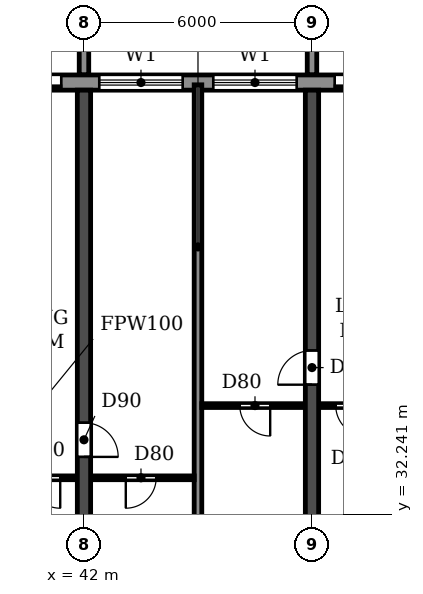
"""IFC4 building model, lengths in metres.
Left out: names, types, materials, properties, quantities, classifications, styles, units other than length and angle.
Written with IfcOpenShell. Run it as: python <this file> out.ifc"""

import sys

from ifc_helpers import new_model, si_unit, direction, frame, frame_2d, origin, place, context, subcontext, project, spatial, polyline, rectangle, outline, extrude, source, transform, mapped, element, fill, save


model = new_model("IFC4")
c1 = context("Model", 3, precision=1e-05, world=origin(), true_north=direction((0.0, 1.0)))
c2 = subcontext(c1, "Body", "Model", "MODEL_VIEW")
j1 = project(units=[si_unit("LENGTHUNIT", "METRE"), si_unit("PLANEANGLEUNIT", "RADIAN")], contexts=[c1])
p1 = place(None, origin())
s1 = spatial("IfcSite", under=j1, at=p1, CompositionType="ELEMENT")
p2 = place(p1, origin())
s2 = spatial("IfcBuilding", under=s1, at=p2, CompositionType="ELEMENT")
p3 = place(p2, frame((0.0, 0.0, 112.5)))
s3 = spatial("IfcBuildingStorey", under=s2, at=p3, CompositionType="ELEMENT", Elevation=112.5)
p4 = place(p3, frame((42.0, 30.525, 0.0), z_axis=(0.0, 0.0, 1.0), x_axis=(0.0, 1.0, 0.0)))
e1 = element("IfcWall", 1, at=p4, inside=s3, PredefinedType="SHEAR", context=c2, shape_type="SweptSolid", body=[
    extrude(rectangle(XDim=12.875, YDim=0.35, at=frame_2d((6.438, 0.0))), origin(), (0.0, 0.0, 1.0), 2.95),
])
p5 = place(p4, frame((3.225, 0.0, 0.0)))
e2 = element("IfcOpeningElement", 2, at=p5, cuts=e1, PredefinedType="OPENING", context=c2, shape_type="SweptSolid", body=[
    extrude(rectangle(XDim=0.9, YDim=2.1, at=frame_2d((0.45, 1.05))), frame((0.0, 0.185, 0.0), z_axis=(0.0, -1.0, 0.0), x_axis=(1.0, 0.0, 0.0)), (0.0, 0.0, 1.0), 0.37),
])
p6 = place(p3, frame((48.0, 30.525, 0.0), z_axis=(0.0, 0.0, 1.0), x_axis=(0.0, 1.0, 0.0)))
e3 = element("IfcWall", 3, at=p6, inside=s3, PredefinedType="SHEAR", context=c2, shape_type="SweptSolid", body=[
    extrude(rectangle(XDim=12.875, YDim=0.35, at=frame_2d((6.438, 0.0))), origin(), (0.0, 0.0, 1.0), 2.95),
])
p7 = place(p6, frame((5.125, 0.0, 0.0)))
e4 = element("IfcOpeningElement", 4, at=p7, cuts=e3, PredefinedType="OPENING", context=c2, shape_type="SweptSolid", body=[
    extrude(rectangle(XDim=0.9, YDim=2.1, at=frame_2d((0.45, 1.05))), frame((0.0, 0.185, 0.0), z_axis=(0.0, -1.0, 0.0), x_axis=(1.0, 0.0, 0.0)), (0.0, 0.0, 1.0), 0.37),
])
p8 = place(p3, frame((85.317, 43.6, 0.0), z_axis=(0.0, 0.0, 1.0), x_axis=(-1.0, 0.0, 0.0)))
e5 = element("IfcWall", 5, at=p8, inside=s3, PredefinedType="STANDARD", context=c2, shape_type="SweptSolid", body=[
    extrude(rectangle(XDim=68.634, YDim=0.4, at=frame_2d((34.317, 0.0))), origin(), (0.0, 0.0, 1.0), 2.95),
])
p9 = place(p8, frame((64.917, 0.0, 0.0)))
e6 = element("IfcOpeningElement", 6, at=p9, cuts=e5, PredefinedType="OPENING", context=c2, shape_type="SweptSolid", body=[
    extrude(rectangle(XDim=1.8, YDim=2.4, at=frame_2d((0.9, 1.2))), frame((0.0, 0.21, 0.0), z_axis=(0.0, -1.0, 0.0), x_axis=(1.0, 0.0, 0.0)), (0.0, 0.0, 1.0), 0.42),
])
p10 = place(p8, frame((61.717, 0.0, 0.9)))
e7 = element("IfcOpeningElement", 7, at=p10, cuts=e5, PredefinedType="OPENING", context=c2, shape_type="SweptSolid", body=[
    extrude(rectangle(XDim=2.2, YDim=1.5, at=frame_2d((1.1, 0.75))), frame((0.0, 0.21, 0.0), z_axis=(0.0, -1.0, 0.0), x_axis=(1.0, 0.0, 0.0)), (0.0, 0.0, 1.0), 0.42),
])
p11 = place(p8, frame((58.717, 0.0, 0.9)))
e8 = element("IfcOpeningElement", 8, at=p11, cuts=e5, PredefinedType="OPENING", context=c2, shape_type="SweptSolid", body=[
    extrude(rectangle(XDim=2.2, YDim=1.5, at=frame_2d((1.1, 0.75))), frame((0.0, 0.21, 0.0), z_axis=(0.0, -1.0, 0.0), x_axis=(1.0, 0.0, 0.0)), (0.0, 0.0, 1.0), 0.42),
])
p12 = place(p8, frame((55.917, 0.0, 0.0)))
e9 = element("IfcOpeningElement", 9, at=p12, cuts=e5, PredefinedType="OPENING", context=c2, shape_type="SweptSolid", body=[
    extrude(rectangle(XDim=1.8, YDim=2.4, at=frame_2d((0.9, 1.2))), frame((0.0, 0.21, 0.0), z_axis=(0.0, -1.0, 0.0), x_axis=(1.0, 0.0, 0.0)), (0.0, 0.0, 1.0), 0.42),
])
p13 = place(p8, frame((52.917, 0.0, 0.0)))
e10 = element("IfcOpeningElement", 10, at=p13, cuts=e5, PredefinedType="OPENING", context=c2, shape_type="SweptSolid", body=[
    extrude(rectangle(XDim=1.8, YDim=2.4, at=frame_2d((0.9, 1.2))), frame((0.0, 0.21, 0.0), z_axis=(0.0, -1.0, 0.0), x_axis=(1.0, 0.0, 0.0)), (0.0, 0.0, 1.0), 0.42),
])
p14 = place(p8, frame((49.717, 0.0, 0.9)))
e11 = element("IfcOpeningElement", 11, at=p14, cuts=e5, PredefinedType="OPENING", context=c2, shape_type="SweptSolid", body=[
    extrude(rectangle(XDim=2.2, YDim=1.5, at=frame_2d((1.1, 0.75))), frame((0.0, 0.21, 0.0), z_axis=(0.0, -1.0, 0.0), x_axis=(1.0, 0.0, 0.0)), (0.0, 0.0, 1.0), 0.42),
])
p15 = place(p8, frame((46.717, 0.0, 0.9)))
e12 = element("IfcOpeningElement", 12, at=p15, cuts=e5, PredefinedType="OPENING", context=c2, shape_type="SweptSolid", body=[
    extrude(rectangle(XDim=2.2, YDim=1.5, at=frame_2d((1.1, 0.75))), frame((0.0, 0.21, 0.0), z_axis=(0.0, -1.0, 0.0), x_axis=(1.0, 0.0, 0.0)), (0.0, 0.0, 1.0), 0.42),
])
p16 = place(p8, frame((43.917, 0.0, 0.0)))
e13 = element("IfcOpeningElement", 13, at=p16, cuts=e5, PredefinedType="OPENING", context=c2, shape_type="SweptSolid", body=[
    extrude(rectangle(XDim=1.8, YDim=2.4, at=frame_2d((0.9, 1.2))), frame((0.0, 0.21, 0.0), z_axis=(0.0, -1.0, 0.0), x_axis=(1.0, 0.0, 0.0)), (0.0, 0.0, 1.0), 0.42),
])
p17 = place(p8, frame((40.717, 0.0, 0.9)))
e14 = element("IfcOpeningElement", 14, at=p17, cuts=e5, PredefinedType="OPENING", context=c2, shape_type="SweptSolid", body=[
    extrude(rectangle(XDim=2.2, YDim=1.5, at=frame_2d((1.1, 0.75))), frame((0.0, 0.21, 0.0), z_axis=(0.0, -1.0, 0.0), x_axis=(1.0, 0.0, 0.0)), (0.0, 0.0, 1.0), 0.42),
])
p18 = place(p8, frame((37.717, 0.0, 0.9)))
e15 = element("IfcOpeningElement", 15, at=p18, cuts=e5, PredefinedType="OPENING", context=c2, shape_type="SweptSolid", body=[
    extrude(rectangle(XDim=2.2, YDim=1.5, at=frame_2d((1.1, 0.75))), frame((0.0, 0.21, 0.0), z_axis=(0.0, -1.0, 0.0), x_axis=(1.0, 0.0, 0.0)), (0.0, 0.0, 1.0), 0.42),
])
p19 = place(p8, frame((34.917, 0.0, 0.0)))
e16 = element("IfcOpeningElement", 16, at=p19, cuts=e5, PredefinedType="OPENING", context=c2, shape_type="SweptSolid", body=[
    extrude(rectangle(XDim=1.8, YDim=2.4, at=frame_2d((0.9, 1.2))), frame((0.0, 0.21, 0.0), z_axis=(0.0, -1.0, 0.0), x_axis=(1.0, 0.0, 0.0)), (0.0, 0.0, 1.0), 0.42),
])
p20 = place(p8, frame((31.717, 0.0, 0.9)))
e17 = element("IfcOpeningElement", 17, at=p20, cuts=e5, PredefinedType="OPENING", context=c2, shape_type="SweptSolid", body=[
    extrude(rectangle(XDim=2.2, YDim=1.5, at=frame_2d((1.1, 0.75))), frame((0.0, 0.21, 0.0), z_axis=(0.0, -1.0, 0.0), x_axis=(1.0, 0.0, 0.0)), (0.0, 0.0, 1.0), 0.42),
])
p21 = place(p8, frame((28.917, 0.0, 0.0)))
e18 = element("IfcOpeningElement", 18, at=p21, cuts=e5, PredefinedType="OPENING", context=c2, shape_type="SweptSolid", body=[
    extrude(rectangle(XDim=1.8, YDim=2.4, at=frame_2d((0.9, 1.2))), frame((0.0, 0.21, 0.0), z_axis=(0.0, -1.0, 0.0), x_axis=(1.0, 0.0, 0.0)), (0.0, 0.0, 1.0), 0.42),
])
p22 = place(p8, frame((25.717, 0.0, 0.9)))
e19 = element("IfcOpeningElement", 19, at=p22, cuts=e5, PredefinedType="OPENING", context=c2, shape_type="SweptSolid", body=[
    extrude(rectangle(XDim=2.2, YDim=1.5, at=frame_2d((1.1, 0.75))), frame((0.0, 0.21, 0.0), z_axis=(0.0, -1.0, 0.0), x_axis=(1.0, 0.0, 0.0)), (0.0, 0.0, 1.0), 0.42),
])
p23 = place(p8, frame((22.717, 0.0, 0.9)))
e20 = element("IfcOpeningElement", 20, at=p23, cuts=e5, PredefinedType="OPENING", context=c2, shape_type="SweptSolid", body=[
    extrude(rectangle(XDim=2.2, YDim=1.5, at=frame_2d((1.1, 0.75))), frame((0.0, 0.21, 0.0), z_axis=(0.0, -1.0, 0.0), x_axis=(1.0, 0.0, 0.0)), (0.0, 0.0, 1.0), 0.42),
])
p24 = place(p8, frame((19.917, 0.0, 0.0)))
e21 = element("IfcOpeningElement", 21, at=p24, cuts=e5, PredefinedType="OPENING", context=c2, shape_type="SweptSolid", body=[
    extrude(rectangle(XDim=1.8, YDim=2.4, at=frame_2d((0.9, 1.2))), frame((0.0, 0.21, 0.0), z_axis=(0.0, -1.0, 0.0), x_axis=(1.0, 0.0, 0.0)), (0.0, 0.0, 1.0), 0.42),
])
p25 = place(p8, frame((16.717, 0.0, 0.9)))
e22 = element("IfcOpeningElement", 22, at=p25, cuts=e5, PredefinedType="OPENING", context=c2, shape_type="SweptSolid", body=[
    extrude(rectangle(XDim=2.2, YDim=1.5, at=frame_2d((1.1, 0.75))), frame((0.0, 0.21, 0.0), z_axis=(0.0, -1.0, 0.0), x_axis=(1.0, 0.0, 0.0)), (0.0, 0.0, 1.0), 0.42),
])
p26 = place(p8, frame((13.917, 0.0, 0.0)))
e23 = element("IfcOpeningElement", 23, at=p26, cuts=e5, PredefinedType="OPENING", context=c2, shape_type="SweptSolid", body=[
    extrude(rectangle(XDim=1.8, YDim=2.4, at=frame_2d((0.9, 1.2))), frame((0.0, 0.21, 0.0), z_axis=(0.0, -1.0, 0.0), x_axis=(1.0, 0.0, 0.0)), (0.0, 0.0, 1.0), 0.42),
])
p27 = place(p8, frame((10.717, 0.0, 0.9)))
e24 = element("IfcOpeningElement", 24, at=p27, cuts=e5, PredefinedType="OPENING", context=c2, shape_type="SweptSolid", body=[
    extrude(rectangle(XDim=2.2, YDim=1.5, at=frame_2d((1.1, 0.75))), frame((0.0, 0.21, 0.0), z_axis=(0.0, -1.0, 0.0), x_axis=(1.0, 0.0, 0.0)), (0.0, 0.0, 1.0), 0.42),
])
p28 = place(p8, frame((7.717, 0.0, 0.9)))
e25 = element("IfcOpeningElement", 25, at=p28, cuts=e5, PredefinedType="OPENING", context=c2, shape_type="SweptSolid", body=[
    extrude(rectangle(XDim=2.2, YDim=1.5, at=frame_2d((1.1, 0.75))), frame((0.0, 0.21, 0.0), z_axis=(0.0, -1.0, 0.0), x_axis=(1.0, 0.0, 0.0)), (0.0, 0.0, 1.0), 0.42),
])
p29 = place(p8, frame((4.917, 0.0, 0.0)))
e26 = element("IfcOpeningElement", 26, at=p29, cuts=e5, PredefinedType="OPENING", context=c2, shape_type="SweptSolid", body=[
    extrude(rectangle(XDim=1.8, YDim=2.4, at=frame_2d((0.9, 1.2))), frame((0.0, 0.21, 0.0), z_axis=(0.0, -1.0, 0.0), x_axis=(1.0, 0.0, 0.0)), (0.0, 0.0, 1.0), 0.42),
])
p30 = place(p8, frame((1.717, 0.0, 0.9)))
e27 = element("IfcOpeningElement", 27, at=p30, cuts=e5, PredefinedType="OPENING", context=c2, shape_type="SweptSolid", body=[
    extrude(rectangle(XDim=2.2, YDim=1.5, at=frame_2d((1.1, 0.75))), frame((0.0, 0.21, 0.0), z_axis=(0.0, -1.0, 0.0), x_axis=(1.0, 0.0, 0.0)), (0.0, 0.0, 1.0), 0.42),
])
m1 = source(origin(), c2, "Body", "SweptSolid", [
    extrude(outline(polyline([(0.0, 0.0), (0.25, 0.0), (0.25, 3.1), (0.0, 3.1), (0.0, 0.0)])), origin(), (0.0, 0.0, 1.0), 3.1),
])
for number, where in (
    (28, (41.875, 43.8, 0.0)),
    (29, (47.875, 43.8, 0.0)),
):
    element("IfcWall", number, at=place(p3, frame(where)), inside=s3, PredefinedType="STANDARD", context=c2, shape_type="MappedRepresentation", body=[
        mapped(m1, transform((0.0, 0.0, 0.0))),
    ])
p31 = place(p3, frame((45.0, 30.535, 0.0), z_axis=(0.0, 0.0, 1.0), x_axis=(0.0, 1.0, 0.0)))
e30 = element("IfcWall", 30, at=p31, inside=s3, PredefinedType="PARTITIONING", context=c2, shape_type="SweptSolid", body=[
    extrude(rectangle(XDim=13.005, YDim=0.2, at=frame_2d((6.502, 0.0))), origin(), (0.0, 0.0, 1.0), 2.95),
])
p32 = place(p3, frame((39.9, 33.2, 0.0), z_axis=(0.0, 0.0, 1.0), x_axis=(1.0, 0.0, 0.0)))
e31 = element("IfcWall", 31, at=p32, inside=s3, PredefinedType="PARTITIONING", context=c2, shape_type="SweptSolid", body=[
    extrude(rectangle(XDim=1.915, YDim=0.1, at=frame_2d((0.958, 0.0))), origin(), (0.0, 0.0, 1.0), 2.95),
])
p33 = place(p32, frame((0.675, 0.0, 0.0)))
e32 = element("IfcOpeningElement", 32, at=p33, cuts=e31, PredefinedType="OPENING", context=c2, shape_type="SweptSolid", body=[
    extrude(rectangle(XDim=0.8, YDim=2.1, at=frame_2d((0.4, 1.05))), frame((0.0, 0.06, 0.0), z_axis=(0.0, -1.0, 0.0), x_axis=(1.0, 0.0, 0.0)), (0.0, 0.0, 1.0), 0.12),
])
p34 = place(p3, frame((42.185, 33.2, 0.0), z_axis=(0.0, 0.0, 1.0), x_axis=(1.0, 0.0, 0.0)))
e33 = element("IfcWall", 33, at=p34, inside=s3, PredefinedType="PARTITIONING", context=c2, shape_type="SweptSolid", body=[
    extrude(rectangle(XDim=2.715, YDim=0.1, at=frame_2d((1.357, 0.0))), origin(), (0.0, 0.0, 1.0), 2.95),
])
p35 = place(p34, frame((0.915, 0.0, 0.0)))
e34 = element("IfcOpeningElement", 34, at=p35, cuts=e33, PredefinedType="OPENING", context=c2, shape_type="SweptSolid", body=[
    extrude(rectangle(XDim=0.8, YDim=2.1, at=frame_2d((0.4, 1.05))), frame((0.0, 0.06, 0.0), z_axis=(0.0, -1.0, 0.0), x_axis=(1.0, 0.0, 0.0)), (0.0, 0.0, 1.0), 0.12),
])
p36 = place(p3, frame((45.1, 35.1, 0.0), z_axis=(0.0, 0.0, 1.0), x_axis=(1.0, 0.0, 0.0)))
e35 = element("IfcWall", 35, at=p36, inside=s3, PredefinedType="PARTITIONING", context=c2, shape_type="SweptSolid", body=[
    extrude(rectangle(XDim=2.715, YDim=0.1, at=frame_2d((1.357, 0.0))), origin(), (0.0, 0.0, 1.0), 2.95),
])
p37 = place(p36, frame((1.0, 0.0, 0.0)))
e36 = element("IfcOpeningElement", 36, at=p37, cuts=e35, PredefinedType="OPENING", context=c2, shape_type="SweptSolid", body=[
    extrude(rectangle(XDim=0.8, YDim=2.1, at=frame_2d((0.4, 1.05))), frame((0.0, 0.06, 0.0), z_axis=(0.0, -1.0, 0.0), x_axis=(1.0, 0.0, 0.0)), (0.0, 0.0, 1.0), 0.12),
])
p38 = place(p3, frame((48.185, 35.1, 0.0), z_axis=(0.0, 0.0, 1.0), x_axis=(1.0, 0.0, 0.0)))
e37 = element("IfcWall", 37, at=p38, inside=s3, PredefinedType="PARTITIONING", context=c2, shape_type="SweptSolid", body=[
    extrude(rectangle(XDim=1.915, YDim=0.1, at=frame_2d((0.958, 0.0))), origin(), (0.0, 0.0, 1.0), 2.95),
])
p39 = place(p38, frame((0.44, 0.0, 0.0)))
e38 = element("IfcOpeningElement", 38, at=p39, cuts=e37, PredefinedType="OPENING", context=c2, shape_type="SweptSolid", body=[
    extrude(rectangle(XDim=0.8, YDim=2.1, at=frame_2d((0.4, 1.05))), frame((0.0, 0.06, 0.0), z_axis=(0.0, -1.0, 0.0), x_axis=(1.0, 0.0, 0.0)), (0.0, 0.0, 1.0), 0.12),
])
p40 = place(p16, origin())
e39 = element("IfcDoor", 39, at=p40, inside=s3, OperationType="DOUBLE_DOOR_SLIDING", PredefinedType="DOOR", context=c2, shape_type="SweptSolid", body=[
    extrude(rectangle(XDim=1.8, YDim=2.4, at=frame_2d((0.9, 1.2))), frame((0.0, 0.025, 0.0), z_axis=(0.0, -1.0, 0.0), x_axis=(1.0, 0.0, 0.0)), (0.0, 0.0, 1.0), 0.05),
])
fill(e13, e39)
p41 = place(p17, origin())
e40 = element("IfcWindow", 40, at=p41, inside=s3, PartitioningType="DOUBLE_PANEL_HORIZONTAL", PredefinedType="WINDOW", context=c2, shape_type="SweptSolid", body=[
    extrude(rectangle(XDim=2.2, YDim=1.5, at=frame_2d((1.1, 0.75))), frame((0.0, 0.03, 0.0), z_axis=(0.0, -1.0, 0.0), x_axis=(1.0, 0.0, 0.0)), (0.0, 0.0, 1.0), 0.06),
])
fill(e14, e40)
p42 = place(p18, origin())
e41 = element("IfcWindow", 41, at=p42, inside=s3, PartitioningType="DOUBLE_PANEL_HORIZONTAL", PredefinedType="WINDOW", context=c2, shape_type="SweptSolid", body=[
    extrude(rectangle(XDim=2.2, YDim=1.5, at=frame_2d((1.1, 0.75))), frame((0.0, 0.03, 0.0), z_axis=(0.0, -1.0, 0.0), x_axis=(1.0, 0.0, 0.0)), (0.0, 0.0, 1.0), 0.06),
])
fill(e15, e41)
p43 = place(p19, origin())
e42 = element("IfcDoor", 42, at=p43, inside=s3, OperationType="DOUBLE_DOOR_SLIDING", PredefinedType="DOOR", context=c2, shape_type="SweptSolid", body=[
    extrude(rectangle(XDim=1.8, YDim=2.4, at=frame_2d((0.9, 1.2))), frame((0.0, 0.025, 0.0), z_axis=(0.0, -1.0, 0.0), x_axis=(1.0, 0.0, 0.0)), (0.0, 0.0, 1.0), 0.05),
])
fill(e16, e42)
p44 = place(p35, frame((0.8, 0.0, 0.0), z_axis=(0.0, 0.0, 1.0), x_axis=(-1.0, 0.0, 0.0)))
e43 = element("IfcDoor", 43, at=p44, inside=s3, OperationType="SINGLE_SWING_RIGHT", PredefinedType="DOOR", context=c2, shape_type="SweptSolid", body=[
    extrude(rectangle(XDim=0.8, YDim=2.1, at=frame_2d((0.4, 1.05))), frame((0.0, 0.025, 0.0), z_axis=(0.0, -1.0, 0.0), x_axis=(1.0, 0.0, 0.0)), (0.0, 0.0, 1.0), 0.05),
])
fill(e34, e43)
p45 = place(p33, frame((0.8, 0.0, 0.0), z_axis=(0.0, 0.0, 1.0), x_axis=(-1.0, 0.0, 0.0)))
e44 = element("IfcDoor", 44, at=p45, inside=s3, OperationType="SINGLE_SWING_LEFT", PredefinedType="DOOR", context=c2, shape_type="SweptSolid", body=[
    extrude(rectangle(XDim=0.8, YDim=2.1, at=frame_2d((0.4, 1.05))), frame((0.0, 0.025, 0.0), z_axis=(0.0, -1.0, 0.0), x_axis=(1.0, 0.0, 0.0)), (0.0, 0.0, 1.0), 0.05),
])
fill(e32, e44)
p46 = place(p5, frame((0.9, 0.0, 0.0), z_axis=(0.0, 0.0, 1.0), x_axis=(-1.0, 0.0, 0.0)))
e45 = element("IfcDoor", 45, at=p46, inside=s3, OperationType="SINGLE_SWING_RIGHT", PredefinedType="DOOR", context=c2, shape_type="SweptSolid", body=[
    extrude(rectangle(XDim=0.9, YDim=2.1, at=frame_2d((0.45, 1.05))), frame((0.0, 0.025, 0.0), z_axis=(0.0, -1.0, 0.0), x_axis=(1.0, 0.0, 0.0)), (0.0, 0.0, 1.0), 0.05),
])
fill(e2, e45)
p47 = place(p37, frame((0.8, 0.0, 0.0), z_axis=(0.0, 0.0, 1.0), x_axis=(-1.0, 0.0, 0.0)))
e46 = element("IfcDoor", 46, at=p47, inside=s3, OperationType="SINGLE_SWING_LEFT", PredefinedType="DOOR", context=c2, shape_type="SweptSolid", body=[
    extrude(rectangle(XDim=0.8, YDim=2.1, at=frame_2d((0.4, 1.05))), frame((0.0, 0.025, 0.0), z_axis=(0.0, -1.0, 0.0), x_axis=(1.0, 0.0, 0.0)), (0.0, 0.0, 1.0), 0.05),
])
fill(e36, e46)
p48 = place(p7, origin())
e47 = element("IfcDoor", 47, at=p48, inside=s3, OperationType="SINGLE_SWING_LEFT", PredefinedType="DOOR", context=c2, shape_type="SweptSolid", body=[
    extrude(rectangle(XDim=0.9, YDim=2.1, at=frame_2d((0.45, 1.05))), frame((0.0, 0.025, 0.0), z_axis=(0.0, -1.0, 0.0), x_axis=(1.0, 0.0, 0.0)), (0.0, 0.0, 1.0), 0.05),
])
fill(e4, e47)
p49 = place(p39, frame((0.8, 0.0, 0.0), z_axis=(0.0, 0.0, 1.0), x_axis=(-1.0, 0.0, 0.0)))
e48 = element("IfcDoor", 48, at=p49, inside=s3, OperationType="SINGLE_SWING_LEFT", PredefinedType="DOOR", context=c2, shape_type="SweptSolid", body=[
    extrude(rectangle(XDim=0.8, YDim=2.1, at=frame_2d((0.4, 1.05))), frame((0.0, 0.025, 0.0), z_axis=(0.0, -1.0, 0.0), x_axis=(1.0, 0.0, 0.0)), (0.0, 0.0, 1.0), 0.05),
])
fill(e38, e48)
save(model, sys.argv[1])
